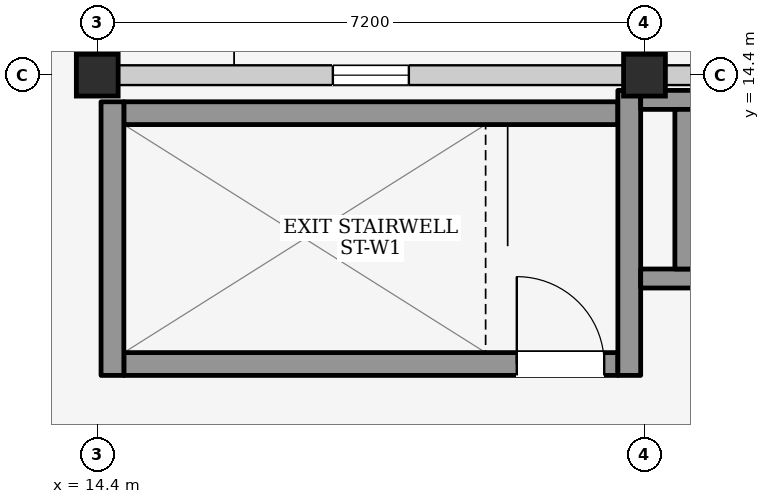
"""IFC4 building model, lengths in metres.
Left out: names, types, materials, properties, quantities, classifications, styles, units other than length and angle.
Written with IfcOpenShell. Run it as: python <this file> out.ifc"""

import sys

from ifc_helpers import new_model, si_unit, direction, frame, frame_2d, origin, origin_2d, place, context, subcontext, project, spatial, rectangle, extrude, element, fill, save


model = new_model("IFC4")
c1 = context("Model", 3, precision=1e-05, world=origin(), true_north=direction((0.0, 1.0)))
c2 = subcontext(c1, "Body", "Model", "MODEL_VIEW")
j1 = project(units=[si_unit("LENGTHUNIT", "METRE"), si_unit("PLANEANGLEUNIT", "RADIAN")], contexts=[c1])
p1 = place(None, origin())
s1 = spatial("IfcSite", under=j1, at=p1, CompositionType="ELEMENT")
p2 = place(p1, origin())
s2 = spatial("IfcBuilding", under=s1, at=p2, CompositionType="ELEMENT")
p3 = place(p2, frame((0.0, 0.0, 28.3)))
s3 = spatial("IfcBuildingStorey", under=s2, at=p3, CompositionType="ELEMENT", Elevation=28.3)
for number, where, z_axis, x_axis in (
    (1, (14.4, 14.4, 0.0), (0.0, 0.0, 1.0), (1.0, 0.0, 0.0)),
    (2, (21.6, 14.4, 0.0), (0.0, 0.0, 1.0), (1.0, 0.0, 0.0)),
):
    element("IfcColumn", number, at=place(p3, frame(where, z_axis=z_axis, x_axis=x_axis)), inside=s3, PredefinedType="COLUMN", context=c2, shape_type="SweptSolid", body=[
        extrude(rectangle(XDim=0.55, YDim=0.55, at=origin_2d()), origin(), (0.0, 0.0, 1.0), 3.2),
    ])
p4 = place(p3, frame((14.4, 14.675, 0.0), z_axis=(0.0, 0.0, 1.0), x_axis=(0.0, 1.0, 0.0)))
e3 = element("IfcWall", 3, at=p4, inside=s3, PredefinedType="ELEMENTEDWALL", context=c2, shape_type="SweptSolid", body=[
    extrude(rectangle(XDim=6.65, YDim=0.26, at=frame_2d((3.325, 0.0))), origin(), (0.0, 0.0, 1.0), 2.445),
])
p5 = place(p4, frame((2.5, 0.0, 0.0)))
e4 = element("IfcOpeningElement", 4, at=p5, cuts=e3, PredefinedType="OPENING", context=c2, shape_type="SweptSolid", body=[
    extrude(rectangle(XDim=1.4, YDim=2.1, at=frame_2d((0.7, 1.05))), frame((0.0, 0.145, 0.0), z_axis=(0.0, -1.0, 0.0), x_axis=(1.0, 0.0, 0.0)), (0.0, 0.0, 1.0), 0.29),
])
p6 = place(p3, frame((14.675, 14.4, 0.0), z_axis=(0.0, 0.0, 1.0), x_axis=(1.0, 0.0, 0.0)))
e5 = element("IfcWall", 5, at=p6, inside=s3, PredefinedType="ELEMENTEDWALL", context=c2, shape_type="SweptSolid", body=[
    extrude(rectangle(XDim=6.65, YDim=0.26, at=frame_2d((3.325, 0.0))), origin(), (0.0, 0.0, 1.0), 2.345),
])
p7 = place(p6, frame((2.825, 0.0, 1.2)))
e6 = element("IfcOpeningElement", 6, at=p7, cuts=e5, PredefinedType="OPENING", context=c2, shape_type="SweptSolid", body=[
    extrude(rectangle(XDim=1.0, YDim=0.9, at=frame_2d((0.5, 0.45))), frame((0.0, 0.145, 0.0), z_axis=(0.0, -1.0, 0.0), x_axis=(1.0, 0.0, 0.0)), (0.0, 0.0, 1.0), 0.29),
])
p8 = place(p3, frame((21.875, 14.4, 0.0), z_axis=(0.0, 0.0, 1.0), x_axis=(1.0, 0.0, 0.0)))
e7 = element("IfcWall", 7, at=p8, inside=s3, PredefinedType="ELEMENTEDWALL", context=c2, shape_type="SweptSolid", body=[
    extrude(rectangle(XDim=6.65, YDim=0.26, at=frame_2d((3.325, 0.0))), origin(), (0.0, 0.0, 1.0), 2.345),
])
p9 = place(p8, frame((2.825, 0.0, 1.2)))
e8 = element("IfcOpeningElement", 8, at=p9, cuts=e7, PredefinedType="OPENING", context=c2, shape_type="SweptSolid", body=[
    extrude(rectangle(XDim=1.0, YDim=0.9, at=frame_2d((0.5, 0.45))), frame((0.0, 0.145, 0.0), z_axis=(0.0, -1.0, 0.0), x_axis=(1.0, 0.0, 0.0)), (0.0, 0.0, 1.0), 0.29),
])
p10 = place(p3, frame((14.75, 10.6, 0.0), z_axis=(0.0, 0.0, 1.0), x_axis=(1.0, 0.0, 0.0)))
e9 = element("IfcWall", 9, at=p10, inside=s3, PredefinedType="SHEAR", context=c2, shape_type="SweptSolid", body=[
    extrude(rectangle(XDim=6.5, YDim=0.3, at=frame_2d((3.25, 0.0))), origin(), (0.0, 0.0, 1.0), 2.95),
])
p11 = place(p10, frame((5.17, 0.0, 0.0)))
e10 = element("IfcOpeningElement", 10, at=p11, cuts=e9, PredefinedType="OPENING", context=c2, shape_type="SweptSolid", body=[
    extrude(rectangle(XDim=1.15, YDim=2.2, at=frame_2d((0.575, 1.1))), frame((0.0, 0.165, 0.0), z_axis=(0.0, -1.0, 0.0), x_axis=(1.0, 0.0, 0.0)), (0.0, 0.0, 1.0), 0.33),
])
p12 = place(p3, frame((14.75, 13.9, 0.0), z_axis=(0.0, 0.0, 1.0), x_axis=(1.0, 0.0, 0.0)))
e11 = element("IfcWall", 11, at=p12, inside=s3, PredefinedType="SHEAR", context=c2, shape_type="SweptSolid", body=[
    extrude(rectangle(XDim=6.5, YDim=0.3, at=frame_2d((3.25, 0.0))), origin(), (0.0, 0.0, 1.0), 2.95),
])
p13 = place(p3, frame((14.6, 10.45, 0.0), z_axis=(0.0, 0.0, 1.0), x_axis=(0.0, 1.0, 0.0)))
e12 = element("IfcWall", 12, at=p13, inside=s3, PredefinedType="SHEAR", context=c2, shape_type="SweptSolid", body=[
    extrude(rectangle(XDim=3.6, YDim=0.3, at=frame_2d((1.8, 0.0))), origin(), (0.0, 0.0, 1.0), 2.95),
])
p14 = place(p3, frame((21.4, 10.45, 0.0), z_axis=(0.0, 0.0, 1.0), x_axis=(0.0, 1.0, 0.0)))
e13 = element("IfcWall", 13, at=p14, inside=s3, PredefinedType="SHEAR", context=c2, shape_type="SweptSolid", body=[
    extrude(rectangle(XDim=3.75, YDim=0.3, at=frame_2d((1.875, 0.0))), origin(), (0.0, 0.0, 1.0), 2.95),
])
p15 = place(p3, frame((21.55, 11.725, 0.0), z_axis=(0.0, 0.0, 1.0), x_axis=(1.0, 0.0, 0.0)))
e14 = element("IfcWall", 14, at=p15, inside=s3, PredefinedType="SHEAR", context=c2, shape_type="SweptSolid", body=[
    extrude(rectangle(XDim=2.55, YDim=0.25, at=frame_2d((1.275, 0.0))), origin(), (0.0, 0.0, 1.0), 2.95),
])
p16 = place(p15, frame((0.95, 0.0, 0.0)))
e15 = element("IfcOpeningElement", 15, at=p16, cuts=e14, PredefinedType="OPENING", context=c2, shape_type="SweptSolid", body=[
    extrude(rectangle(XDim=1.1, YDim=2.15, at=frame_2d((0.55, 1.075))), frame((0.0, 0.14, 0.0), z_axis=(0.0, -1.0, 0.0), x_axis=(1.0, 0.0, 0.0)), (0.0, 0.0, 1.0), 0.28),
])
p17 = place(p3, frame((21.55, 14.075, 0.0), z_axis=(0.0, 0.0, 1.0), x_axis=(1.0, 0.0, 0.0)))
e16 = element("IfcWall", 16, at=p17, inside=s3, PredefinedType="SHEAR", context=c2, shape_type="SweptSolid", body=[
    extrude(rectangle(XDim=2.55, YDim=0.25, at=frame_2d((1.275, 0.0))), origin(), (0.0, 0.0, 1.0), 2.95),
])
p18 = place(p3, frame((22.125, 11.85, 0.0), z_axis=(0.0, 0.0, 1.0), x_axis=(0.0, 1.0, 0.0)))
e17 = element("IfcWall", 17, at=p18, inside=s3, PredefinedType="SHEAR", context=c2, shape_type="SweptSolid", body=[
    extrude(rectangle(XDim=2.1, YDim=0.25, at=frame_2d((1.05, 0.0))), origin(), (0.0, 0.0, 1.0), 2.95),
])
p19 = place(p7, origin())
e18 = element("IfcWindow", 18, at=p19, inside=s3, PartitioningType="SINGLE_PANEL", PredefinedType="WINDOW", context=c2, shape_type="SweptSolid", body=[
    extrude(rectangle(XDim=1.0, YDim=0.9, at=frame_2d((0.5, 0.45))), frame((0.0, 0.03, 0.0), z_axis=(0.0, -1.0, 0.0), x_axis=(1.0, 0.0, 0.0)), (0.0, 0.0, 1.0), 0.06),
])
fill(e6, e18)
p20 = place(p11, origin())
e19 = element("IfcDoor", 19, at=p20, inside=s3, OperationType="SINGLE_SWING_LEFT", PredefinedType="DOOR", context=c2, shape_type="SweptSolid", body=[
    extrude(rectangle(XDim=1.15, YDim=2.2, at=frame_2d((0.575, 1.1))), frame((0.0, 0.025, 0.0), z_axis=(0.0, -1.0, 0.0), x_axis=(1.0, 0.0, 0.0)), (0.0, 0.0, 1.0), 0.05),
])
fill(e10, e19)
save(model, sys.argv[1])
